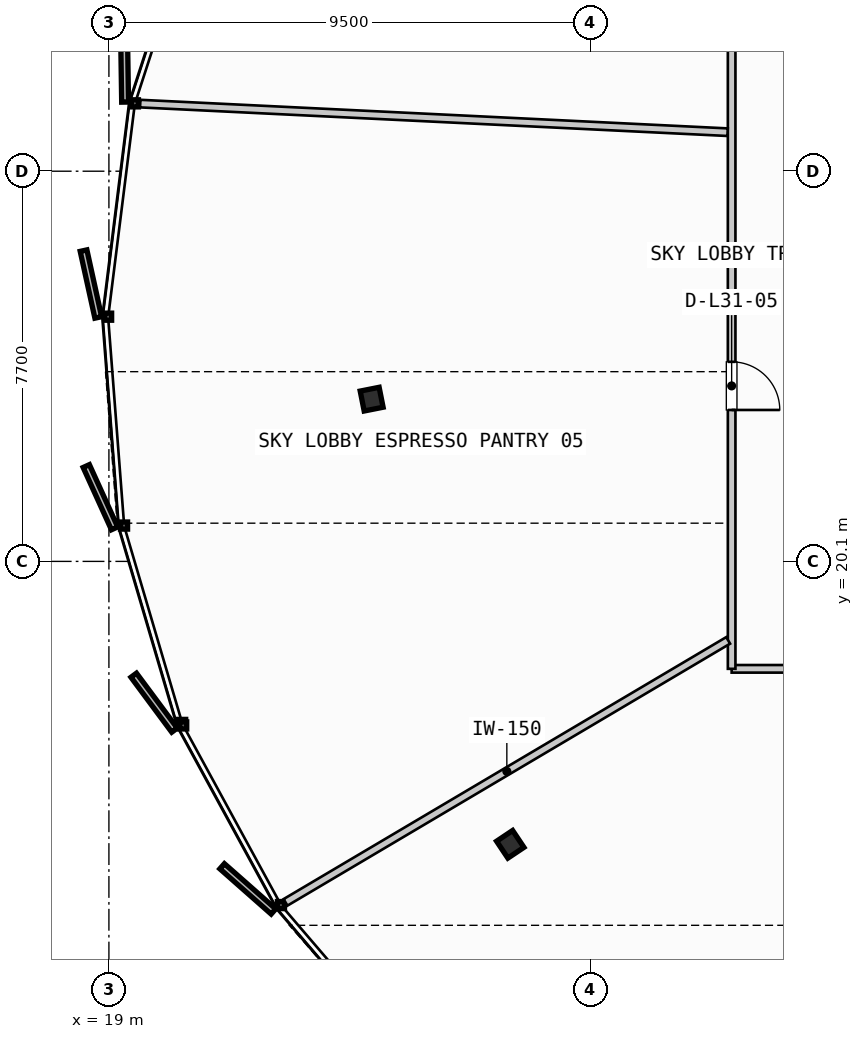
"""IFC4 building model, lengths in metres.
Left out: names, types, materials, properties, quantities, classifications, styles, units other than length and angle.
Written with IfcOpenShell. Run it as: python <this file> out.ifc"""

import sys

from ifc_helpers import new_model, si_unit, direction, frame, frame_2d, origin, origin_2d, place, context, subcontext, project, spatial, rectangle, i_section, extrude, source, transform, mapped, element, fill, save


model = new_model("IFC4")
c1 = context("Model", 3, precision=1e-05, world=origin(), true_north=direction((0.0, 1.0)))
c2 = subcontext(c1, "Body", "Model", "MODEL_VIEW")
j1 = project(units=[si_unit("LENGTHUNIT", "METRE"), si_unit("PLANEANGLEUNIT", "RADIAN")], contexts=[c1])
p1 = place(None, origin())
s1 = spatial("IfcSite", under=j1, at=p1, CompositionType="ELEMENT")
p2 = place(p1, origin())
s2 = spatial("IfcBuilding", under=s1, at=p2, CompositionType="ELEMENT")
p3 = place(p2, frame((0.0, 0.0, 125.2)))
s3 = spatial("IfcBuildingStorey", under=s2, at=p3, CompositionType="ELEMENT", Elevation=125.2)
m1 = source(origin(), c2, "Body", "SweptSolid", [
    extrude(i_section(OverallWidth=0.401, OverallDepth=0.381, WebThickness=0.032, FlangeThickness=0.051, FilletRadius=0.015, at=origin_2d()), origin(), (0.0, 0.0, 1.0), 3.35),
])
for number, where, z_axis, x_axis in (
    (1, (24.185, 23.302, 0.0), (0.0, 0.0, 1.0), (-0.981, -0.195, 0.0)),
    (2, (26.921, 14.517, 0.0), (0.0, 0.0, 1.0), (-0.831, -0.556, 0.0)),
):
    element("IfcColumn", number, at=place(p3, frame(where, z_axis=z_axis, x_axis=x_axis)), inside=s3, PredefinedType="COLUMN", context=c2, shape_type="MappedRepresentation", body=[
        mapped(m1, transform((0.0, 0.0, 0.0), scale=1.0)),
    ])
p4 = place(p3, frame((31.29, 17.98, 0.0), z_axis=(0.0, 0.0, 1.0), x_axis=(1.0, 0.0, 0.0)))
e3 = element("IfcWall", 3, at=p4, inside=s3, PredefinedType="PARTITIONING", context=c2, shape_type="SweptSolid", body=[
    extrude(rectangle(XDim=29.46, YDim=0.15, at=frame_2d((14.73, 0.0))), origin(), (0.0, 0.0, 1.0), 2.635),
])
p5 = place(p4, frame((12.807, 0.0, 0.0)))
e4 = element("IfcOpeningElement", 4, at=p5, cuts=e3, PredefinedType="OPENING", context=c2, shape_type="SweptSolid", body=[
    extrude(rectangle(XDim=0.95, YDim=2.15, at=frame_2d((0.475, 1.075))), frame((0.0, 0.085, 0.0), z_axis=(0.0, -1.0, 0.0), x_axis=(1.0, 0.0, 0.0)), (0.0, 0.0, 1.0), 0.17),
])
p6 = place(p3, frame((31.29, 38.04, 0.0), z_axis=(0.0, 0.0, 1.0), x_axis=(0.0, -1.0, 0.0)))
e5 = element("IfcWall", 5, at=p6, inside=s3, PredefinedType="PARTITIONING", context=c2, shape_type="SweptSolid", body=[
    extrude(rectangle(XDim=20.06, YDim=0.15, at=frame_2d((10.03, 0.0))), origin(), (0.0, 0.0, 1.0), 2.635),
])
p7 = place(p6, frame((4.552, 0.0, 0.0)))
e6 = element("IfcOpeningElement", 6, at=p7, cuts=e5, PredefinedType="OPENING", context=c2, shape_type="SweptSolid", body=[
    extrude(rectangle(XDim=0.95, YDim=2.15, at=frame_2d((0.475, 1.075))), frame((0.0, 0.085, 0.0), z_axis=(0.0, -1.0, 0.0), x_axis=(1.0, 0.0, 0.0)), (0.0, 0.0, 1.0), 0.17),
])
p8 = place(p6, frame((14.002, 0.0, 0.0)))
e7 = element("IfcOpeningElement", 7, at=p8, cuts=e5, PredefinedType="OPENING", context=c2, shape_type="SweptSolid", body=[
    extrude(rectangle(XDim=0.95, YDim=2.15, at=frame_2d((0.475, 1.075))), frame((0.0, 0.085, 0.0), z_axis=(0.0, -1.0, 0.0), x_axis=(1.0, 0.0, 0.0)), (0.0, 0.0, 1.0), 0.17),
])
p9 = place(p3, frame((31.221, 18.541, 0.0), z_axis=(0.0, 0.0, 1.0), x_axis=(-0.860592603092, -0.509293993194, 0.0)))
e8 = element("IfcWall", 8, at=p9, inside=s3, PredefinedType="PARTITIONING", context=c2, shape_type="SweptSolid", body=[
    extrude(rectangle(XDim=10.151, YDim=0.15, at=frame_2d((5.075, 0.0))), origin(), (0.0, 0.0, 1.0), 2.635),
])
p10 = place(p3, frame((31.21, 28.57, 0.0), z_axis=(0.0, 0.0, 1.0), x_axis=(-0.998817663402, 0.048613529761, 0.0)))
e9 = element("IfcWall", 9, at=p10, inside=s3, PredefinedType="PARTITIONING", context=c2, shape_type="SweptSolid", body=[
    extrude(rectangle(XDim=11.606, YDim=0.15, at=frame_2d((5.803, 0.0))), origin(), (0.0, 0.0, 1.0), 2.635),
])
m2 = source(origin(), c2, "Body", "SweptSolid", [
    extrude(rectangle(XDim=0.95, YDim=2.15, at=frame_2d((0.475, 1.075))), frame((0.0, 0.025, 0.0), z_axis=(0.0, -1.0, 0.0), x_axis=(1.0, 0.0, 0.0)), (0.0, 0.0, 1.0), 0.05),
])
p11 = place(p8, origin())
e10 = element("IfcDoor", 10, at=p11, inside=s3, OperationType="SINGLE_SWING_RIGHT", PredefinedType="DOOR", context=c2, shape_type="MappedRepresentation", body=[
    mapped(m2, transform((0.0, 0.0, 0.0), scale=1.0)),
])
fill(e7, e10)
save(model, sys.argv[1])
